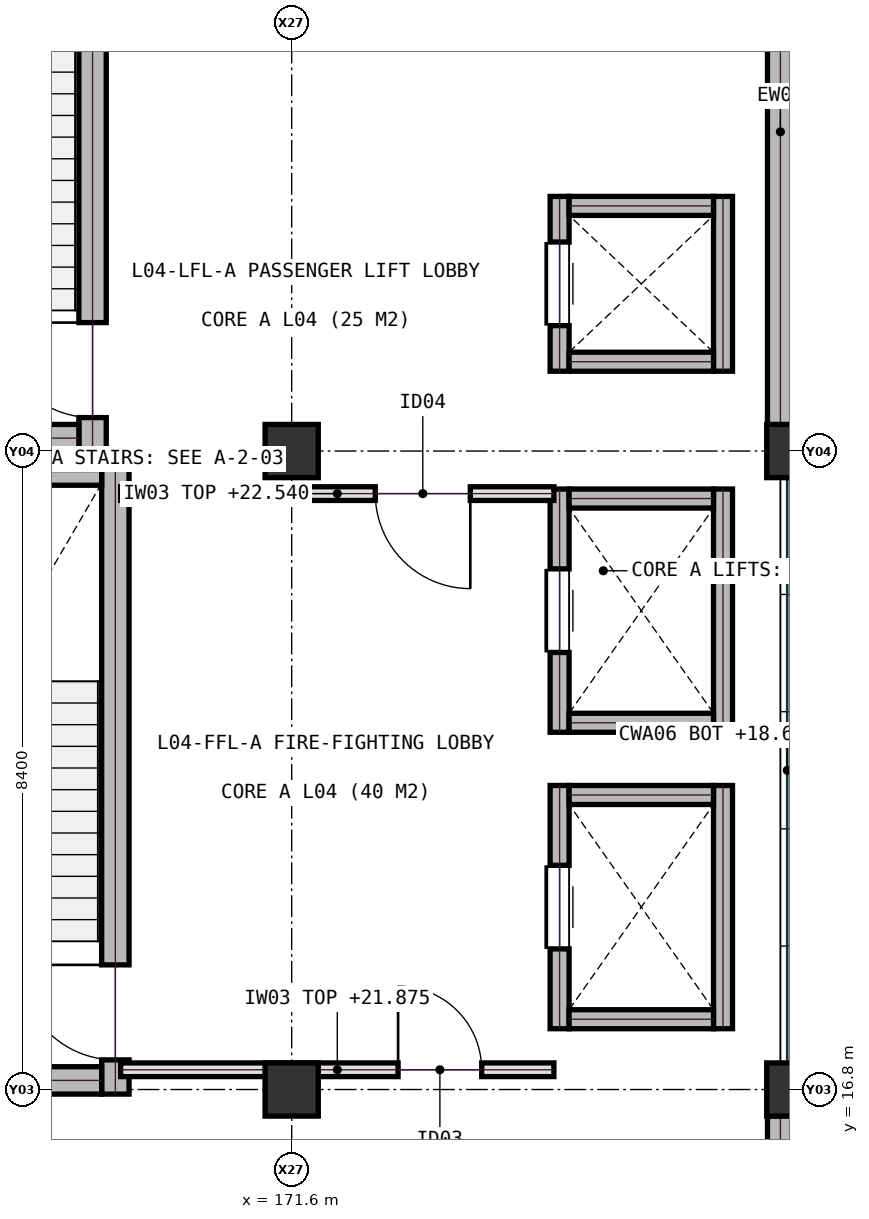
"""IFC4 building model, lengths in metres.
Left out: names, types, materials, properties, quantities, classifications, styles, units other than length and angle.
Written with IfcOpenShell. Run it as: python <this file> out.ifc"""

import sys

from ifc_helpers import new_model, si_unit, direction, frame, frame_2d, origin, origin_2d, place, context, subcontext, project, spatial, rectangle, extrude, element, fill, save


model = new_model("IFC4")
c1 = context("Model", 3, precision=1e-05, world=origin(), true_north=direction((0.0, 1.0)))
c2 = subcontext(c1, "Body", "Model", "MODEL_VIEW")
j1 = project(units=[si_unit("LENGTHUNIT", "METRE"), si_unit("PLANEANGLEUNIT", "RADIAN")], contexts=[c1])
p1 = place(None, origin())
s1 = spatial("IfcSite", under=j1, at=p1, CompositionType="ELEMENT")
p2 = place(p1, origin())
s2 = spatial("IfcBuilding", under=s1, at=p2, CompositionType="ELEMENT")
p3 = place(p2, frame((0.0, 0.0, 18.6)))
s3 = spatial("IfcBuildingStorey", under=s2, at=p3, CompositionType="ELEMENT", Elevation=18.6)
for number, where, z_axis, x_axis in (
    (1, (171.6, 16.8, 0.0), (0.0, 0.0, 1.0), (1.0, 0.0, 0.0)),
    (2, (171.6, 25.2, 0.0), (0.0, 0.0, 1.0), (1.0, 0.0, 0.0)),
    (3, (178.2, 16.8, 0.0), (0.0, 0.0, 1.0), (1.0, 0.0, 0.0)),
    (4, (178.2, 25.2, 0.0), (0.0, 0.0, 1.0), (1.0, 0.0, 0.0)),
):
    element("IfcColumn", number, at=place(p3, frame(where, z_axis=z_axis, x_axis=x_axis)), inside=s3, PredefinedType="COLUMN", context=c2, shape_type="SweptSolid", body=[
        extrude(rectangle(XDim=0.7, YDim=0.7, at=origin_2d()), origin(), (0.0, 0.0, 1.0), 4.2),
    ])
for number, where, z_axis, x_axis in (
    (5, (178.03, 8.745, 0.0), (0.0, 0.0, 1.0), (0.0, 1.0, 0.0)),
    (6, (178.03, 25.545, 0.0), (0.0, 0.0, 1.0), (0.0, 1.0, 0.0)),
):
    element("IfcWall", number, at=place(p3, frame(where, z_axis=z_axis, x_axis=x_axis)), inside=s3, PredefinedType="SHEAR", context=c2, shape_type="SweptSolid", body=[
        extrude(rectangle(XDim=7.71, YDim=0.34, at=frame_2d((3.855, 0.0))), origin(), (0.0, 0.0, 1.0), 3.94),
    ])
p4 = place(p3, frame((169.28, 16.74, 0.0), z_axis=(0.0, 0.0, 1.0), x_axis=(0.0, 1.0, 0.0)))
e7 = element("IfcWall", 7, at=p4, inside=s3, PredefinedType="SHEAR", context=c2, shape_type="SweptSolid", body=[
    extrude(rectangle(XDim=8.37, YDim=0.36, at=frame_2d((4.185, 0.0))), origin(), (0.0, 0.0, 1.0), 3.94),
])
p5 = place(p4, frame((0.45, 0.0, 0.0)))
e8 = element("IfcOpeningElement", 8, at=p5, cuts=e7, PredefinedType="OPENING", context=c2, shape_type="SweptSolid", body=[
    extrude(rectangle(XDim=1.25, YDim=2.15, at=frame_2d((0.625, 1.075))), frame((0.0, 0.19, 0.0), z_axis=(0.0, -1.0, 0.0), x_axis=(1.0, 0.0, 0.0)), (0.0, 0.0, 1.0), 0.38),
])
for number, where, z_axis, x_axis in (
    (9, (165.6, 24.93, 0.0), (0.0, 0.0, 1.0), (1.0, 0.0, 0.0)),
    (10, (165.6, 16.92, 0.0), (0.0, 0.0, 1.0), (1.0, 0.0, 0.0)),
):
    element("IfcWall", number, at=place(p3, frame(where, z_axis=z_axis, x_axis=x_axis)), inside=s3, PredefinedType="SHEAR", context=c2, shape_type="SweptSolid", body=[
        extrude(rectangle(XDim=3.5, YDim=0.36, at=frame_2d((1.75, 0.0))), origin(), (0.0, 0.0, 1.0), 3.94),
    ])
p6 = place(p3, frame((168.98, 25.19, 0.0), z_axis=(0.0, 0.0, 1.0), x_axis=(0.0, 1.0, 0.0)))
e11 = element("IfcWall", 11, at=p6, inside=s3, PredefinedType="SHEAR", context=c2, shape_type="SweptSolid", body=[
    extrude(rectangle(XDim=8.17, YDim=0.36, at=frame_2d((4.085, 0.0))), origin(), (0.0, 0.0, 1.0), 3.94),
])
p7 = place(p6, frame((0.45, 0.0, 0.0)))
e12 = element("IfcOpeningElement", 12, at=p7, cuts=e11, PredefinedType="OPENING", context=c2, shape_type="SweptSolid", body=[
    extrude(rectangle(XDim=1.25, YDim=2.15, at=frame_2d((0.625, 1.075))), frame((0.0, 0.19, 0.0), z_axis=(0.0, -1.0, 0.0), x_axis=(1.0, 0.0, 0.0)), (0.0, 0.0, 1.0), 0.38),
])
p8 = place(p3, frame((165.6, 25.37, 0.0), z_axis=(0.0, 0.0, 1.0), x_axis=(1.0, 0.0, 0.0)))
e13 = element("IfcWall", 13, at=p8, inside=s3, PredefinedType="SHEAR", context=c2, shape_type="SweptSolid", body=[
    extrude(rectangle(XDim=3.2, YDim=0.36, at=frame_2d((1.6, 0.0))), origin(), (0.0, 0.0, 1.0), 3.94),
])
p9 = place(p3, frame((175.125, 17.6, 0.0), z_axis=(0.0, 0.0, 1.0), x_axis=(0.0, 1.0, 0.0)))
e14 = element("IfcWall", 14, at=p9, inside=s3, PredefinedType="SHEAR", context=c2, shape_type="SweptSolid", body=[
    extrude(rectangle(XDim=3.2, YDim=0.25, at=frame_2d((1.6, 0.0))), origin(), (0.0, 0.0, 1.0), 3.94),
])
p10 = place(p9, frame((1.05, 0.0, 0.0)))
e15 = element("IfcOpeningElement", 15, at=p10, cuts=e14, PredefinedType="OPENING", context=c2, shape_type="SweptSolid", body=[
    extrude(rectangle(XDim=1.1, YDim=2.15, at=frame_2d((0.55, 1.075))), frame((0.0, 0.135, 0.0), z_axis=(0.0, -1.0, 0.0), x_axis=(1.0, 0.0, 0.0)), (0.0, 0.0, 1.0), 0.27),
])
p11 = place(p3, frame((177.275, 17.6, 0.0), z_axis=(0.0, 0.0, 1.0), x_axis=(0.0, 1.0, 0.0)))
e16 = element("IfcWall", 16, at=p11, inside=s3, PredefinedType="SHEAR", context=c2, shape_type="SweptSolid", body=[
    extrude(rectangle(XDim=3.2, YDim=0.25, at=frame_2d((1.6, 0.0))), origin(), (0.0, 0.0, 1.0), 3.94),
])
for number, where, z_axis, x_axis in (
    (17, (175.25, 17.725, 0.0), (0.0, 0.0, 1.0), (1.0, 0.0, 0.0)),
    (18, (175.25, 20.675, 0.0), (0.0, 0.0, 1.0), (1.0, 0.0, 0.0)),
):
    element("IfcWall", number, at=place(p3, frame(where, z_axis=z_axis, x_axis=x_axis)), inside=s3, PredefinedType="SHEAR", context=c2, shape_type="SweptSolid", body=[
        extrude(rectangle(XDim=1.9, YDim=0.25, at=frame_2d((0.95, 0.0))), origin(), (0.0, 0.0, 1.0), 3.94),
    ])
p12 = place(p3, frame((175.125, 21.5, 0.0), z_axis=(0.0, 0.0, 1.0), x_axis=(0.0, 1.0, 0.0)))
e19 = element("IfcWall", 19, at=p12, inside=s3, PredefinedType="SHEAR", context=c2, shape_type="SweptSolid", body=[
    extrude(rectangle(XDim=3.2, YDim=0.25, at=frame_2d((1.6, 0.0))), origin(), (0.0, 0.0, 1.0), 3.94),
])
p13 = place(p12, frame((1.05, 0.0, 0.0)))
e20 = element("IfcOpeningElement", 20, at=p13, cuts=e19, PredefinedType="OPENING", context=c2, shape_type="SweptSolid", body=[
    extrude(rectangle(XDim=1.1, YDim=2.15, at=frame_2d((0.55, 1.075))), frame((0.0, 0.135, 0.0), z_axis=(0.0, -1.0, 0.0), x_axis=(1.0, 0.0, 0.0)), (0.0, 0.0, 1.0), 0.27),
])
p14 = place(p3, frame((177.275, 21.5, 0.0), z_axis=(0.0, 0.0, 1.0), x_axis=(0.0, 1.0, 0.0)))
e21 = element("IfcWall", 21, at=p14, inside=s3, PredefinedType="SHEAR", context=c2, shape_type="SweptSolid", body=[
    extrude(rectangle(XDim=3.2, YDim=0.25, at=frame_2d((1.6, 0.0))), origin(), (0.0, 0.0, 1.0), 3.94),
])
for number, where, z_axis, x_axis in (
    (22, (175.25, 21.625, 0.0), (0.0, 0.0, 1.0), (1.0, 0.0, 0.0)),
    (23, (175.25, 24.575, 0.0), (0.0, 0.0, 1.0), (1.0, 0.0, 0.0)),
):
    element("IfcWall", number, at=place(p3, frame(where, z_axis=z_axis, x_axis=x_axis)), inside=s3, PredefinedType="SHEAR", context=c2, shape_type="SweptSolid", body=[
        extrude(rectangle(XDim=1.9, YDim=0.25, at=frame_2d((0.95, 0.0))), origin(), (0.0, 0.0, 1.0), 3.94),
    ])
p15 = place(p3, frame((175.125, 26.25, 0.0), z_axis=(0.0, 0.0, 1.0), x_axis=(0.0, 1.0, 0.0)))
e24 = element("IfcWall", 24, at=p15, inside=s3, PredefinedType="SHEAR", context=c2, shape_type="SweptSolid", body=[
    extrude(rectangle(XDim=2.3, YDim=0.25, at=frame_2d((1.15, 0.0))), origin(), (0.0, 0.0, 1.0), 3.94),
])
p16 = place(p15, frame((0.6, 0.0, 0.0)))
e25 = element("IfcOpeningElement", 25, at=p16, cuts=e24, PredefinedType="OPENING", context=c2, shape_type="SweptSolid", body=[
    extrude(rectangle(XDim=1.1, YDim=2.15, at=frame_2d((0.55, 1.075))), frame((0.0, 0.135, 0.0), z_axis=(0.0, -1.0, 0.0), x_axis=(1.0, 0.0, 0.0)), (0.0, 0.0, 1.0), 0.27),
])
p17 = place(p3, frame((177.275, 26.25, 0.0), z_axis=(0.0, 0.0, 1.0), x_axis=(0.0, 1.0, 0.0)))
e26 = element("IfcWall", 26, at=p17, inside=s3, PredefinedType="SHEAR", context=c2, shape_type="SweptSolid", body=[
    extrude(rectangle(XDim=2.3, YDim=0.25, at=frame_2d((1.15, 0.0))), origin(), (0.0, 0.0, 1.0), 3.94),
])
for number, where, z_axis, x_axis in (
    (27, (175.25, 26.375, 0.0), (0.0, 0.0, 1.0), (1.0, 0.0, 0.0)),
    (28, (175.25, 28.425, 0.0), (0.0, 0.0, 1.0), (1.0, 0.0, 0.0)),
):
    element("IfcWall", number, at=place(p3, frame(where, z_axis=z_axis, x_axis=x_axis)), inside=s3, PredefinedType="SHEAR", context=c2, shape_type="SweptSolid", body=[
        extrude(rectangle(XDim=1.9, YDim=0.25, at=frame_2d((0.95, 0.0))), origin(), (0.0, 0.0, 1.0), 3.94),
    ])
p18 = place(p3, frame((169.35, 24.64, 0.0), z_axis=(0.0, 0.0, 1.0), x_axis=(1.0, 0.0, 0.0)))
e29 = element("IfcWall", 29, at=p18, inside=s3, PredefinedType="SOLIDWALL", context=c2, shape_type="SweptSolid", body=[
    extrude(rectangle(XDim=5.7, YDim=0.18, at=frame_2d((2.85, 0.0))), origin(), (0.0, 0.0, 1.0), 3.94),
])
p19 = place(p18, frame((3.35, 0.0, 0.0)))
e30 = element("IfcOpeningElement", 30, at=p19, cuts=e29, PredefinedType="OPENING", context=c2, shape_type="SweptSolid", body=[
    extrude(rectangle(XDim=1.25, YDim=2.15, at=frame_2d((0.625, 1.075))), frame((0.0, 0.1, 0.0), z_axis=(0.0, -1.0, 0.0), x_axis=(1.0, 0.0, 0.0)), (0.0, 0.0, 1.0), 0.2),
])
p20 = place(p3, frame((169.35, 17.06, 0.0), z_axis=(0.0, 0.0, 1.0), x_axis=(1.0, 0.0, 0.0)))
e31 = element("IfcWall", 31, at=p20, inside=s3, PredefinedType="SOLIDWALL", context=c2, shape_type="SweptSolid", body=[
    extrude(rectangle(XDim=5.7, YDim=0.18, at=frame_2d((2.85, 0.0))), origin(), (0.0, 0.0, 1.0), 3.275),
])
p21 = place(p20, frame((3.65, 0.0, 0.0)))
e32 = element("IfcOpeningElement", 32, at=p21, cuts=e31, PredefinedType="OPENING", context=c2, shape_type="SweptSolid", body=[
    extrude(rectangle(XDim=1.1, YDim=2.15, at=frame_2d((0.55, 1.075))), frame((0.0, 0.1, 0.0), z_axis=(0.0, -1.0, 0.0), x_axis=(1.0, 0.0, 0.0)), (0.0, 0.0, 1.0), 0.2),
])
p22 = place(p5, origin())
e33 = element("IfcDoor", 33, at=p22, inside=s3, OperationType="SINGLE_SWING_RIGHT", PredefinedType="DOOR", context=c2, shape_type="SweptSolid", body=[
    extrude(rectangle(XDim=1.25, YDim=2.15, at=frame_2d((0.625, 1.075))), frame((0.0, 0.025, 0.0), z_axis=(0.0, -1.0, 0.0), x_axis=(1.0, 0.0, 0.0)), (0.0, 0.0, 1.0), 0.05),
])
fill(e8, e33)
p23 = place(p7, origin())
e34 = element("IfcDoor", 34, at=p23, inside=s3, OperationType="SINGLE_SWING_RIGHT", PredefinedType="DOOR", context=c2, shape_type="SweptSolid", body=[
    extrude(rectangle(XDim=1.25, YDim=2.15, at=frame_2d((0.625, 1.075))), frame((0.0, 0.025, 0.0), z_axis=(0.0, -1.0, 0.0), x_axis=(1.0, 0.0, 0.0)), (0.0, 0.0, 1.0), 0.05),
])
fill(e12, e34)
p24 = place(p10, origin())
e35 = element("IfcDoor", 35, at=p24, inside=s3, OperationType="SLIDING_TO_LEFT", PredefinedType="DOOR", context=c2, shape_type="SweptSolid", body=[
    extrude(rectangle(XDim=1.1, YDim=2.15, at=frame_2d((0.55, 1.075))), frame((0.0, 0.025, 0.0), z_axis=(0.0, -1.0, 0.0), x_axis=(1.0, 0.0, 0.0)), (0.0, 0.0, 1.0), 0.05),
])
fill(e15, e35)
p25 = place(p13, origin())
e36 = element("IfcDoor", 36, at=p25, inside=s3, OperationType="SLIDING_TO_LEFT", PredefinedType="DOOR", context=c2, shape_type="SweptSolid", body=[
    extrude(rectangle(XDim=1.1, YDim=2.15, at=frame_2d((0.55, 1.075))), frame((0.0, 0.025, 0.0), z_axis=(0.0, -1.0, 0.0), x_axis=(1.0, 0.0, 0.0)), (0.0, 0.0, 1.0), 0.05),
])
fill(e20, e36)
p26 = place(p16, origin())
e37 = element("IfcDoor", 37, at=p26, inside=s3, OperationType="SLIDING_TO_LEFT", PredefinedType="DOOR", context=c2, shape_type="SweptSolid", body=[
    extrude(rectangle(XDim=1.1, YDim=2.15, at=frame_2d((0.55, 1.075))), frame((0.0, 0.025, 0.0), z_axis=(0.0, -1.0, 0.0), x_axis=(1.0, 0.0, 0.0)), (0.0, 0.0, 1.0), 0.05),
])
fill(e25, e37)
p27 = place(p19, frame((1.25, 0.0, 0.0), z_axis=(0.0, 0.0, 1.0), x_axis=(-1.0, 0.0, 0.0)))
e38 = element("IfcDoor", 38, at=p27, inside=s3, OperationType="SINGLE_SWING_RIGHT", PredefinedType="DOOR", context=c2, shape_type="SweptSolid", body=[
    extrude(rectangle(XDim=1.25, YDim=2.15, at=frame_2d((0.625, 1.075))), frame((0.0, 0.025, 0.0), z_axis=(0.0, -1.0, 0.0), x_axis=(1.0, 0.0, 0.0)), (0.0, 0.0, 1.0), 0.05),
])
fill(e30, e38)
p28 = place(p21, origin())
e39 = element("IfcDoor", 39, at=p28, inside=s3, OperationType="SINGLE_SWING_LEFT", PredefinedType="DOOR", context=c2, shape_type="SweptSolid", body=[
    extrude(rectangle(XDim=1.1, YDim=2.15, at=frame_2d((0.55, 1.075))), frame((0.0, 0.025, 0.0), z_axis=(0.0, -1.0, 0.0), x_axis=(1.0, 0.0, 0.0)), (0.0, 0.0, 1.0), 0.05),
])
fill(e32, e39)
save(model, sys.argv[1])
